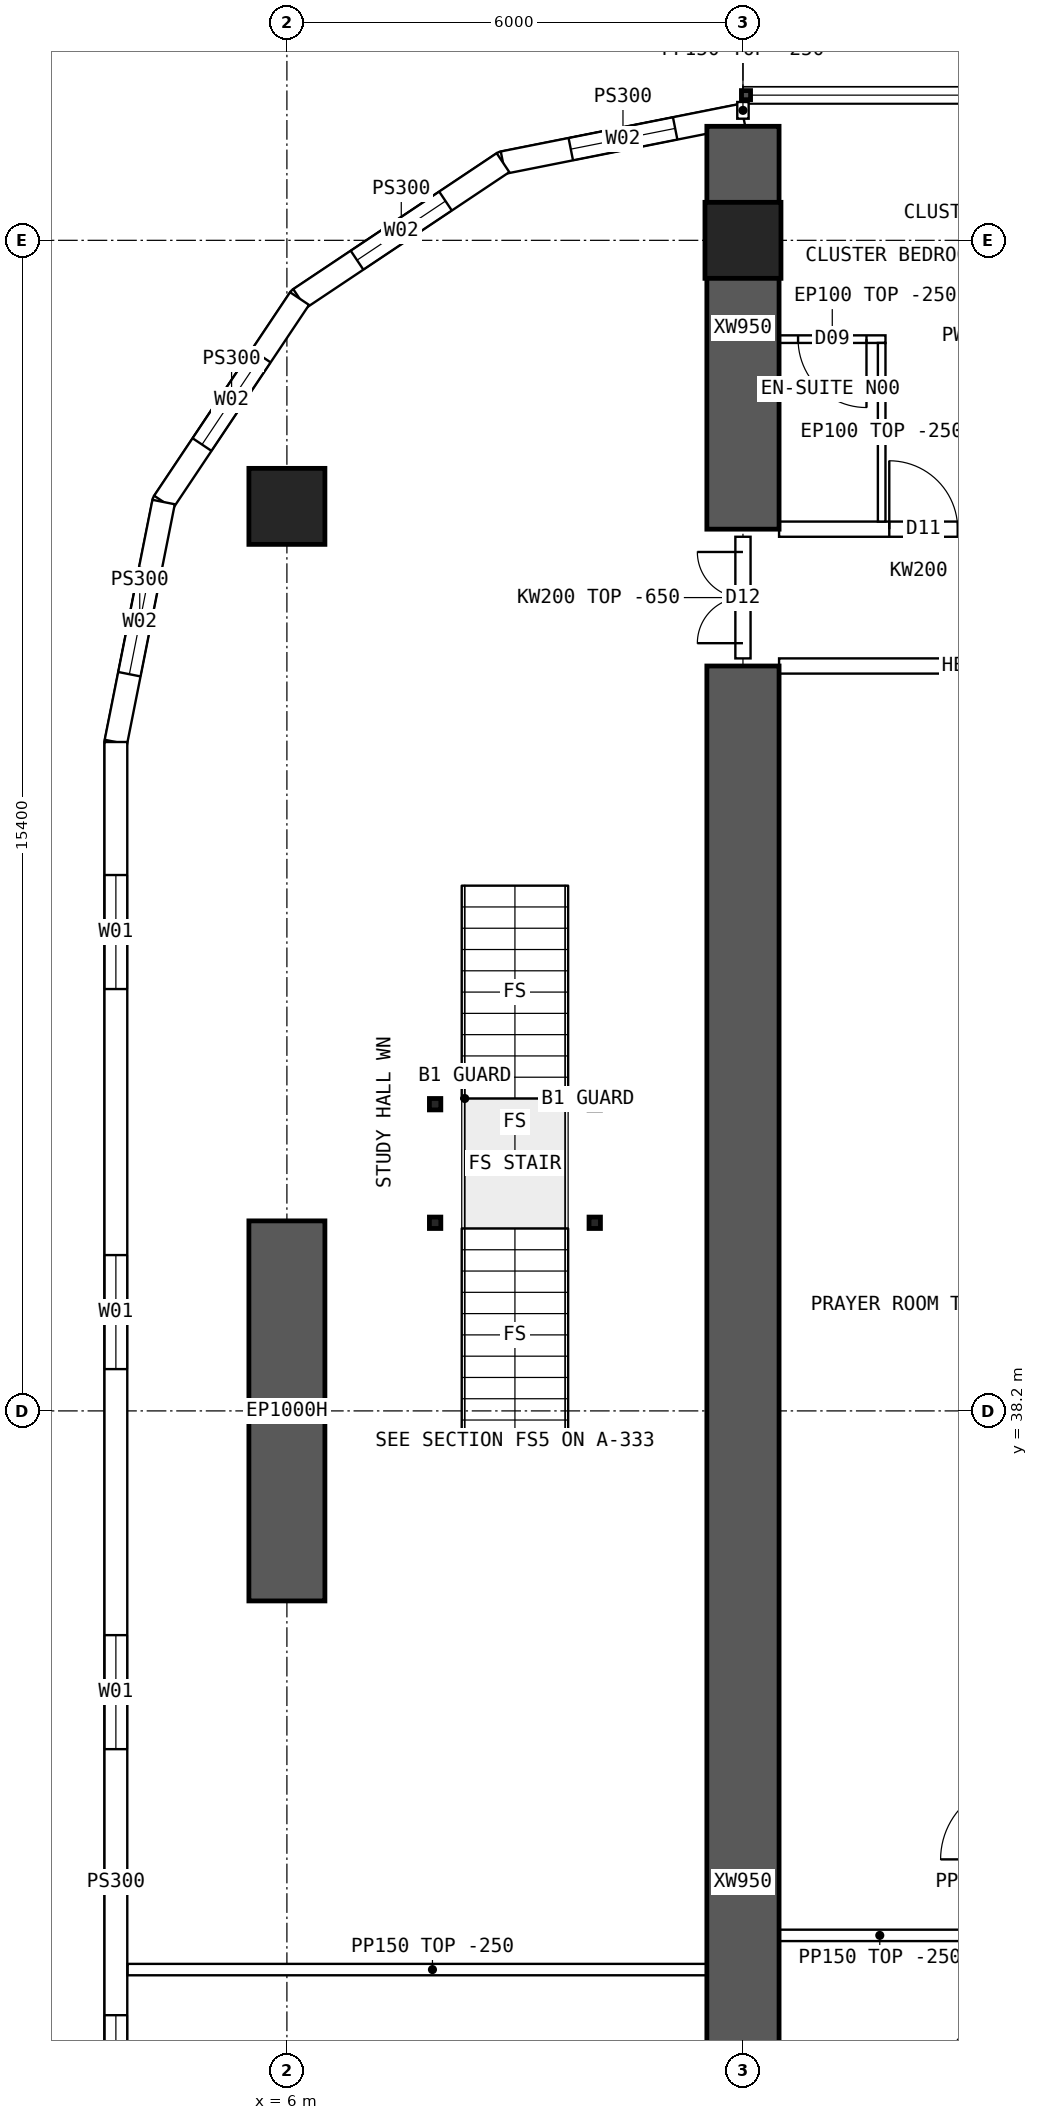
"""IFC4 building model, lengths in metres.
Left out: names, types, materials, properties, quantities, classifications, styles, units other than length and angle.
Written with IfcOpenShell. Run it as: python <this file> out.ifc"""

import sys

from ifc_helpers import new_model, si_unit, direction, frame, frame_2d, origin, origin_2d, place, context, subcontext, project, spatial, polyline, rectangle, hollow_rectangle, outline, extrude, element, fill, save


model = new_model("IFC4")
c1 = context("Model", 3, precision=1e-05, world=origin(), true_north=direction((0.0, 1.0)))
c2 = subcontext(c1, "Body", "Model", "MODEL_VIEW")
j1 = project(units=[si_unit("LENGTHUNIT", "METRE"), si_unit("PLANEANGLEUNIT", "RADIAN")], contexts=[c1])
p1 = place(None, origin())
s1 = spatial("IfcSite", under=j1, at=p1, CompositionType="ELEMENT")
p2 = place(p1, origin())
s2 = spatial("IfcBuilding", under=s1, at=p2, CompositionType="ELEMENT")
p3 = place(p2, frame((0.0, 0.0, 84.4)))
s3 = spatial("IfcBuildingStorey", under=s2, at=p3, CompositionType="ELEMENT", Elevation=84.4)
for number, where, z_axis, x_axis in (
    (1, (12.0, 53.6, 0.0), (0.0, 0.0, 1.0), (1.0, 0.0, 0.0)),
    (2, (6.0, 50.1, 0.0), (0.0, 0.0, 1.0), (1.0, 0.0, 0.0)),
):
    element("IfcColumn", number, at=place(p3, frame(where, z_axis=z_axis, x_axis=x_axis)), inside=s3, PredefinedType="COLUMN", context=c2, shape_type="SweptSolid", body=[
        extrude(hollow_rectangle(XDim=1.0, YDim=1.0, WallThickness=0.1, at=origin_2d()), origin(), (0.0, 0.0, 1.0), 3.75),
    ])
p4 = place(p3, frame((6.0, 35.7, 0.0), z_axis=(0.0, 0.0, 1.0), x_axis=(0.0, 1.0, 0.0)))
e3 = element("IfcWall", 3, at=p4, inside=s3, PredefinedType="SHEAR", context=c2, shape_type="SweptSolid", body=[
    extrude(rectangle(XDim=5.0, YDim=1.0, at=frame_2d((2.5, 0.0))), origin(), (0.0, 0.0, 1.0), 3.75),
])
p5 = place(p3, frame((12.0, 49.8, 0.0), z_axis=(0.0, 0.0, 1.0), x_axis=(0.0, 1.0, 0.0)))
e4 = element("IfcWall", 4, at=p5, inside=s3, PredefinedType="SHEAR", context=c2, shape_type="SweptSolid", body=[
    extrude(rectangle(XDim=5.3, YDim=0.95, at=frame_2d((2.65, 0.0))), origin(), (0.0, 0.0, 1.0), 3.75),
])
p6 = place(p3, frame((12.0, 16.0, 0.0), z_axis=(0.0, 0.0, 1.0), x_axis=(0.0, 1.0, 0.0)))
e5 = element("IfcWall", 5, at=p6, inside=s3, PredefinedType="SHEAR", context=c2, shape_type="SweptSolid", body=[
    extrude(rectangle(XDim=32.0, YDim=0.95, at=frame_2d((16.0, 0.0))), origin(), (0.0, 0.0, 1.0), 3.75),
])
p7 = place(p3, frame((3.75, 47.0, 0.0), z_axis=(0.0, 0.0, 1.0), x_axis=(0.0, -1.0, 0.0)))
e6 = element("IfcWall", 6, at=p7, inside=s3, PredefinedType="SOLIDWALL", context=c2, shape_type="SweptSolid", body=[
    extrude(outline(polyline([(-0.015, -0.15), (30.015, -0.15), (29.985, 0.15), (0.015, 0.15), (-0.015, -0.15)])), origin(), (0.0, 0.0, 1.0), 3.5),
])
p8 = place(p7, frame((1.75, 0.0, 0.9)))
e7 = element("IfcOpeningElement", 7, at=p8, cuts=e6, PredefinedType="OPENING", context=c2, shape_type="SweptSolid", body=[
    extrude(rectangle(XDim=1.5, YDim=2.0, at=frame_2d((0.75, 1.0))), frame((0.0, 0.16, 0.0), z_axis=(0.0, -1.0, 0.0), x_axis=(1.0, 0.0, 0.0)), (0.0, 0.0, 1.0), 0.32),
])
p9 = place(p7, frame((6.75, 0.0, 0.9)))
e8 = element("IfcOpeningElement", 8, at=p9, cuts=e6, PredefinedType="OPENING", context=c2, shape_type="SweptSolid", body=[
    extrude(rectangle(XDim=1.5, YDim=2.0, at=frame_2d((0.75, 1.0))), frame((0.0, 0.16, 0.0), z_axis=(0.0, -1.0, 0.0), x_axis=(1.0, 0.0, 0.0)), (0.0, 0.0, 1.0), 0.32),
])
p10 = place(p7, frame((11.75, 0.0, 0.9)))
e9 = element("IfcOpeningElement", 9, at=p10, cuts=e6, PredefinedType="OPENING", context=c2, shape_type="SweptSolid", body=[
    extrude(rectangle(XDim=1.5, YDim=2.0, at=frame_2d((0.75, 1.0))), frame((0.0, 0.16, 0.0), z_axis=(0.0, -1.0, 0.0), x_axis=(1.0, 0.0, 0.0)), (0.0, 0.0, 1.0), 0.32),
])
p11 = place(p7, frame((16.75, 0.0, 0.9)))
e10 = element("IfcOpeningElement", 10, at=p11, cuts=e6, PredefinedType="OPENING", context=c2, shape_type="SweptSolid", body=[
    extrude(rectangle(XDim=1.5, YDim=2.0, at=frame_2d((0.75, 1.0))), frame((0.0, 0.16, 0.0), z_axis=(0.0, -1.0, 0.0), x_axis=(1.0, 0.0, 0.0)), (0.0, 0.0, 1.0), 0.32),
])
p12 = place(p7, frame((21.75, 0.0, 0.9)))
e11 = element("IfcOpeningElement", 11, at=p12, cuts=e6, PredefinedType="OPENING", context=c2, shape_type="SweptSolid", body=[
    extrude(rectangle(XDim=1.5, YDim=2.0, at=frame_2d((0.75, 1.0))), frame((0.0, 0.16, 0.0), z_axis=(0.0, -1.0, 0.0), x_axis=(1.0, 0.0, 0.0)), (0.0, 0.0, 1.0), 0.32),
])
p13 = place(p7, frame((26.75, 0.0, 0.9)))
e12 = element("IfcOpeningElement", 12, at=p13, cuts=e6, PredefinedType="OPENING", context=c2, shape_type="SweptSolid", body=[
    extrude(rectangle(XDim=1.5, YDim=2.0, at=frame_2d((0.75, 1.0))), frame((0.0, 0.16, 0.0), z_axis=(0.0, -1.0, 0.0), x_axis=(1.0, 0.0, 0.0)), (0.0, 0.0, 1.0), 0.32),
])
p14 = place(p3, frame((12.0, 55.25, 0.0), z_axis=(0.0, 0.0, 1.0), x_axis=(-0.980787251524, -0.195080412259, 0.0)))
e13 = element("IfcWall", 13, at=p14, inside=s3, PredefinedType="SOLIDWALL", context=c2, shape_type="SweptSolid", body=[
    extrude(outline(polyline([(-0.03, -0.15), (3.249, -0.15), (3.189, 0.15), (0.03, 0.15), (-0.03, -0.15)])), origin(), (0.0, 0.0, 1.0), 3.5),
])
p15 = place(p14, frame((0.909, 0.0, 0.9)))
e14 = element("IfcOpeningElement", 14, at=p15, cuts=e13, PredefinedType="OPENING", context=c2, shape_type="SweptSolid", body=[
    extrude(rectangle(XDim=1.4, YDim=1.8, at=frame_2d((0.7, 0.9))), frame((0.0, 0.16, 0.0), z_axis=(0.0, -1.0, 0.0), x_axis=(1.0, 0.0, 0.0)), (0.0, 0.0, 1.0), 0.32),
])
p16 = place(p3, frame((8.843, 54.622, 0.0), z_axis=(0.0, 0.0, 1.0), x_axis=(-0.831443069936, -0.555609954424, 0.0)))
e15 = element("IfcWall", 15, at=p16, inside=s3, PredefinedType="SOLIDWALL", context=c2, shape_type="SweptSolid", body=[
    extrude(outline(polyline([(-0.03, -0.15), (3.249, -0.15), (3.189, 0.15), (0.03, 0.15), (-0.03, -0.15)])), origin(), (0.0, 0.0, 1.0), 3.5),
])
p17 = place(p16, frame((0.909, 0.0, 0.9)))
e16 = element("IfcOpeningElement", 16, at=p17, cuts=e15, PredefinedType="OPENING", context=c2, shape_type="SweptSolid", body=[
    extrude(rectangle(XDim=1.4, YDim=1.8, at=frame_2d((0.7, 0.9))), frame((0.0, 0.16, 0.0), z_axis=(0.0, -1.0, 0.0), x_axis=(1.0, 0.0, 0.0)), (0.0, 0.0, 1.0), 0.32),
])
p18 = place(p3, frame((6.167, 52.833, 0.0), z_axis=(0.0, 0.0, 1.0), x_axis=(-0.555609954424, -0.831443069936, 0.0)))
e17 = element("IfcWall", 17, at=p18, inside=s3, PredefinedType="SOLIDWALL", context=c2, shape_type="SweptSolid", body=[
    extrude(outline(polyline([(-0.03, -0.15), (3.249, -0.15), (3.189, 0.15), (0.03, 0.15), (-0.03, -0.15)])), origin(), (0.0, 0.0, 1.0), 3.5),
])
p19 = place(p18, frame((0.909, 0.0, 0.9)))
e18 = element("IfcOpeningElement", 18, at=p19, cuts=e17, PredefinedType="OPENING", context=c2, shape_type="SweptSolid", body=[
    extrude(rectangle(XDim=1.4, YDim=1.8, at=frame_2d((0.7, 0.9))), frame((0.0, 0.16, 0.0), z_axis=(0.0, -1.0, 0.0), x_axis=(1.0, 0.0, 0.0)), (0.0, 0.0, 1.0), 0.32),
])
p20 = place(p3, frame((4.378, 50.157, 0.0), z_axis=(0.0, 0.0, 1.0), x_axis=(-0.195080412259, -0.980787251524, 0.0)))
e19 = element("IfcWall", 19, at=p20, inside=s3, PredefinedType="SOLIDWALL", context=c2, shape_type="SweptSolid", body=[
    extrude(outline(polyline([(-0.03, -0.15), (3.234, -0.15), (3.204, 0.15), (0.03, 0.15), (-0.03, -0.15)])), origin(), (0.0, 0.0, 1.0), 3.5),
])
p21 = place(p20, frame((0.909, 0.0, 0.9)))
e20 = element("IfcOpeningElement", 20, at=p21, cuts=e19, PredefinedType="OPENING", context=c2, shape_type="SweptSolid", body=[
    extrude(rectangle(XDim=1.4, YDim=1.8, at=frame_2d((0.7, 0.9))), frame((0.0, 0.16, 0.0), z_axis=(0.0, -1.0, 0.0), x_axis=(1.0, 0.0, 0.0)), (0.0, 0.0, 1.0), 0.32),
])
p22 = place(p3, frame((12.475, 49.8, 0.0), z_axis=(0.0, 0.0, 1.0), x_axis=(1.0, 0.0, 0.0)))
e21 = element("IfcWall", 21, at=p22, inside=s3, PredefinedType="SOLIDWALL", context=c2, shape_type="SweptSolid", body=[
    extrude(outline(polyline([(0.0, 0.0), (5.05, 0.0), (5.05, 3.1), (0.0, 3.1), (0.0, 0.0)])), frame((0.0, 0.1, 0.0), z_axis=(0.0, -1.0, 0.0), x_axis=(1.0, 0.0, 0.0)), (0.0, 0.0, 1.0), 0.2),
])
p23 = place(p22, frame((1.45, 0.0, 0.0)))
e22 = element("IfcOpeningElement", 22, at=p23, cuts=e21, PredefinedType="OPENING", context=c2, shape_type="SweptSolid", body=[
    extrude(rectangle(XDim=0.9, YDim=2.1, at=frame_2d((0.45, 1.05))), frame((0.0, 0.11, 0.0), z_axis=(0.0, -1.0, 0.0), x_axis=(1.0, 0.0, 0.0)), (0.0, 0.0, 1.0), 0.22),
])
p24 = place(p22, frame((2.7, 0.0, 0.0)))
e23 = element("IfcOpeningElement", 23, at=p24, cuts=e21, PredefinedType="OPENING", context=c2, shape_type="SweptSolid", body=[
    extrude(rectangle(XDim=0.9, YDim=2.1, at=frame_2d((0.45, 1.05))), frame((0.0, 0.11, 0.0), z_axis=(0.0, -1.0, 0.0), x_axis=(1.0, 0.0, 0.0)), (0.0, 0.0, 1.0), 0.22),
])
p25 = place(p3, frame((12.475, 48.0, 0.0), z_axis=(0.0, 0.0, 1.0), x_axis=(1.0, 0.0, 0.0)))
e24 = element("IfcWall", 24, at=p25, inside=s3, PredefinedType="SOLIDWALL", context=c2, shape_type="SweptSolid", body=[
    extrude(rectangle(XDim=5.05, YDim=0.2, at=frame_2d((2.525, 0.0))), origin(), (0.0, 0.0, 1.0), 3.5),
])
p26 = place(p25, frame((3.325, 0.0, 0.0)))
e25 = element("IfcOpeningElement", 25, at=p26, cuts=e24, PredefinedType="OPENING", context=c2, shape_type="SweptSolid", body=[
    extrude(rectangle(XDim=1.6, YDim=2.1, at=frame_2d((0.8, 1.05))), frame((0.0, 0.11, 0.0), z_axis=(0.0, -1.0, 0.0), x_axis=(1.0, 0.0, 0.0)), (0.0, 0.0, 1.0), 0.22),
])
p27 = place(p3, frame((12.475, 52.3, 0.0), z_axis=(0.0, 0.0, 1.0), x_axis=(1.0, 0.0, 0.0)))
e26 = element("IfcWall", 26, at=p27, inside=s3, PredefinedType="PARTITIONING", context=c2, shape_type="SweptSolid", body=[
    extrude(rectangle(XDim=1.4, YDim=0.1, at=frame_2d((0.7, 0.0))), origin(), (0.0, 0.0, 1.0), 3.5),
])
p28 = place(p27, frame((0.25, 0.0, 0.0)))
e27 = element("IfcOpeningElement", 27, at=p28, cuts=e26, PredefinedType="OPENING", context=c2, shape_type="SweptSolid", body=[
    extrude(rectangle(XDim=0.9, YDim=2.1, at=frame_2d((0.45, 1.05))), frame((0.0, 0.06, 0.0), z_axis=(0.0, -1.0, 0.0), x_axis=(1.0, 0.0, 0.0)), (0.0, 0.0, 1.0), 0.12),
])
p29 = place(p3, frame((13.825, 52.25, 0.0), z_axis=(0.0, 0.0, 1.0), x_axis=(0.0, -1.0, 0.0)))
e28 = element("IfcWall", 28, at=p29, inside=s3, PredefinedType="PARTITIONING", context=c2, shape_type="SweptSolid", body=[
    extrude(outline(polyline([(0.0, 0.0), (2.35, 0.0), (2.35, 3.1), (2.302, 3.1), (2.3, 3.5), (0.0, 3.5), (0.0, 0.0)])), frame((0.0, 0.05, 0.0), z_axis=(0.0, -1.0, 0.0), x_axis=(1.0, 0.0, 0.0)), (0.0, 0.0, 1.0), 0.1),
])
p30 = place(p3, frame((12.0, 31.3, 0.0), z_axis=(0.0, 0.0, 1.0), x_axis=(1.0, 0.0, 0.0)))
e29 = element("IfcWall", 29, at=p30, inside=s3, PredefinedType="PARTITIONING", context=c2, shape_type="SweptSolid", body=[
    extrude(rectangle(XDim=3.6, YDim=0.15, at=frame_2d((1.8, 0.0))), origin(), (0.0, 0.0, 1.0), 3.5),
])
p31 = place(p3, frame((3.905, 30.85, 0.0), z_axis=(0.0, 0.0, 1.0), x_axis=(1.0, 0.0, 0.0)))
e30 = element("IfcWall", 30, at=p31, inside=s3, PredefinedType="PARTITIONING", context=c2, shape_type="SweptSolid", body=[
    extrude(outline(polyline([(0.0, 0.0), (8.02, 0.0), (8.02, 3.5), (2.397, 3.5), (2.395, 3.05), (1.797, 3.05), (1.795, 3.5), (0.0, 3.5), (0.0, 0.0)])), frame((0.0, 0.075, 0.0), z_axis=(0.0, -1.0, 0.0), x_axis=(1.0, 0.0, 0.0)), (0.0, 0.0, 1.0), 0.15),
])
p32 = place(p3, frame((12.0, 48.1, 0.0), z_axis=(0.0, 0.0, 1.0), x_axis=(0.0, 1.0, 0.0)))
e31 = element("IfcWall", 31, at=p32, inside=s3, PredefinedType="SOLIDWALL", context=c2, shape_type="SweptSolid", body=[
    extrude(outline(polyline([(0.0, 0.0), (1.6, 0.0), (1.6, 3.1), (0.0, 3.1), (0.0, 0.0)])), frame((0.0, 0.1, 0.0), z_axis=(0.0, -1.0, 0.0), x_axis=(1.0, 0.0, 0.0)), (0.0, 0.0, 1.0), 0.2),
])
p33 = place(p32, frame((0.2, 0.0, 0.0)))
e32 = element("IfcOpeningElement", 32, at=p33, cuts=e31, PredefinedType="OPENING", context=c2, shape_type="SweptSolid", body=[
    extrude(rectangle(XDim=1.2, YDim=2.1, at=frame_2d((0.6, 1.05))), frame((0.0, 0.11, 0.0), z_axis=(0.0, -1.0, 0.0), x_axis=(1.0, 0.0, 0.0)), (0.0, 0.0, 1.0), 0.22),
])
p34 = place(p3, frame((12.0, 55.2, 0.0), z_axis=(0.0, 0.0, 1.0), x_axis=(0.0, 1.0, 0.0)))
e33 = element("IfcWall", 33, at=p34, inside=s3, PredefinedType="PARTITIONING", context=c2, shape_type="SweptSolid", body=[
    extrude(rectangle(XDim=0.22, YDim=0.15, at=frame_2d((0.11, 0.0))), origin(), (0.0, 0.0, 1.0), 3.5),
])
for number, where, z_axis, x_axis in (
    (34, (7.95, 40.675, 0.0), (0.0, 0.0, 1.0), (1.0, 0.0, 0.0)),
    (35, (10.05, 40.675, 0.0), (0.0, 0.0, 1.0), (1.0, 0.0, 0.0)),
    (36, (7.95, 42.235, 0.0), (0.0, 0.0, 1.0), (1.0, 0.0, 0.0)),
    (37, (10.05, 42.235, 0.0), (0.0, 0.0, 1.0), (1.0, 0.0, 0.0)),
):
    element("IfcColumn", number, at=place(p3, frame(where, z_axis=z_axis, x_axis=x_axis)), inside=s3, PredefinedType="COLUMN", context=c2, shape_type="SweptSolid", body=[
        extrude(hollow_rectangle(XDim=0.15, YDim=0.15, WallThickness=0.008, at=origin_2d()), origin(), (0.0, 0.0, 1.0), 3.5),
    ])
p35 = place(p8, origin())
e38 = element("IfcWindow", 38, at=p35, inside=s3, PartitioningType="SINGLE_PANEL", PredefinedType="WINDOW", context=c2, shape_type="SweptSolid", body=[
    extrude(rectangle(XDim=1.5, YDim=2.0, at=frame_2d((0.75, 1.0))), frame((0.0, 0.03, 0.0), z_axis=(0.0, -1.0, 0.0), x_axis=(1.0, 0.0, 0.0)), (0.0, 0.0, 1.0), 0.06),
])
fill(e7, e38)
p36 = place(p9, origin())
e39 = element("IfcWindow", 39, at=p36, inside=s3, PartitioningType="SINGLE_PANEL", PredefinedType="WINDOW", context=c2, shape_type="SweptSolid", body=[
    extrude(rectangle(XDim=1.5, YDim=2.0, at=frame_2d((0.75, 1.0))), frame((0.0, 0.03, 0.0), z_axis=(0.0, -1.0, 0.0), x_axis=(1.0, 0.0, 0.0)), (0.0, 0.0, 1.0), 0.06),
])
fill(e8, e39)
p37 = place(p10, origin())
e40 = element("IfcWindow", 40, at=p37, inside=s3, PartitioningType="SINGLE_PANEL", PredefinedType="WINDOW", context=c2, shape_type="SweptSolid", body=[
    extrude(rectangle(XDim=1.5, YDim=2.0, at=frame_2d((0.75, 1.0))), frame((0.0, 0.03, 0.0), z_axis=(0.0, -1.0, 0.0), x_axis=(1.0, 0.0, 0.0)), (0.0, 0.0, 1.0), 0.06),
])
fill(e9, e40)
p38 = place(p11, origin())
e41 = element("IfcWindow", 41, at=p38, inside=s3, PartitioningType="SINGLE_PANEL", PredefinedType="WINDOW", context=c2, shape_type="SweptSolid", body=[
    extrude(rectangle(XDim=1.5, YDim=2.0, at=frame_2d((0.75, 1.0))), frame((0.0, 0.03, 0.0), z_axis=(0.0, -1.0, 0.0), x_axis=(1.0, 0.0, 0.0)), (0.0, 0.0, 1.0), 0.06),
])
fill(e10, e41)
p39 = place(p15, origin())
e42 = element("IfcWindow", 42, at=p39, inside=s3, PartitioningType="SINGLE_PANEL", PredefinedType="WINDOW", context=c2, shape_type="SweptSolid", body=[
    extrude(rectangle(XDim=1.4, YDim=1.8, at=frame_2d((0.7, 0.9))), frame((0.0, 0.03, 0.0), z_axis=(0.0, -1.0, 0.0), x_axis=(1.0, 0.0, 0.0)), (0.0, 0.0, 1.0), 0.06),
])
fill(e14, e42)
p40 = place(p17, origin())
e43 = element("IfcWindow", 43, at=p40, inside=s3, PartitioningType="SINGLE_PANEL", PredefinedType="WINDOW", context=c2, shape_type="SweptSolid", body=[
    extrude(rectangle(XDim=1.4, YDim=1.8, at=frame_2d((0.7, 0.9))), frame((0.0, 0.03, 0.0), z_axis=(0.0, -1.0, 0.0), x_axis=(1.0, 0.0, 0.0)), (0.0, 0.0, 1.0), 0.06),
])
fill(e16, e43)
p41 = place(p19, origin())
e44 = element("IfcWindow", 44, at=p41, inside=s3, PartitioningType="SINGLE_PANEL", PredefinedType="WINDOW", context=c2, shape_type="SweptSolid", body=[
    extrude(rectangle(XDim=1.4, YDim=1.8, at=frame_2d((0.7, 0.9))), frame((0.0, 0.03, 0.0), z_axis=(0.0, -1.0, 0.0), x_axis=(1.0, 0.0, 0.0)), (0.0, 0.0, 1.0), 0.06),
])
fill(e18, e44)
p42 = place(p21, origin())
e45 = element("IfcWindow", 45, at=p42, inside=s3, PartitioningType="SINGLE_PANEL", PredefinedType="WINDOW", context=c2, shape_type="SweptSolid", body=[
    extrude(rectangle(XDim=1.4, YDim=1.8, at=frame_2d((0.7, 0.9))), frame((0.0, 0.03, 0.0), z_axis=(0.0, -1.0, 0.0), x_axis=(1.0, 0.0, 0.0)), (0.0, 0.0, 1.0), 0.06),
])
fill(e20, e45)
p43 = place(p28, origin())
e46 = element("IfcDoor", 46, at=p43, inside=s3, OperationType="SINGLE_SWING_RIGHT", PredefinedType="DOOR", context=c2, shape_type="SweptSolid", body=[
    extrude(rectangle(XDim=0.9, YDim=2.1, at=frame_2d((0.45, 1.05))), frame((0.0, 0.025, 0.0), z_axis=(0.0, -1.0, 0.0), x_axis=(1.0, 0.0, 0.0)), (0.0, 0.0, 1.0), 0.05),
])
fill(e27, e46)
p44 = place(p23, origin())
e47 = element("IfcDoor", 47, at=p44, inside=s3, OperationType="SINGLE_SWING_LEFT", PredefinedType="DOOR", context=c2, shape_type="SweptSolid", body=[
    extrude(rectangle(XDim=0.9, YDim=2.1, at=frame_2d((0.45, 1.05))), frame((0.0, 0.025, 0.0), z_axis=(0.0, -1.0, 0.0), x_axis=(1.0, 0.0, 0.0)), (0.0, 0.0, 1.0), 0.05),
])
fill(e22, e47)
p45 = place(p33, origin())
e48 = element("IfcDoor", 48, at=p45, inside=s3, OperationType="DOUBLE_DOOR_SINGLE_SWING", PredefinedType="DOOR", context=c2, shape_type="SweptSolid", body=[
    extrude(rectangle(XDim=1.2, YDim=2.1, at=frame_2d((0.6, 1.05))), frame((0.0, 0.025, 0.0), z_axis=(0.0, -1.0, 0.0), x_axis=(1.0, 0.0, 0.0)), (0.0, 0.0, 1.0), 0.05),
])
fill(e32, e48)
save(model, sys.argv[1])
